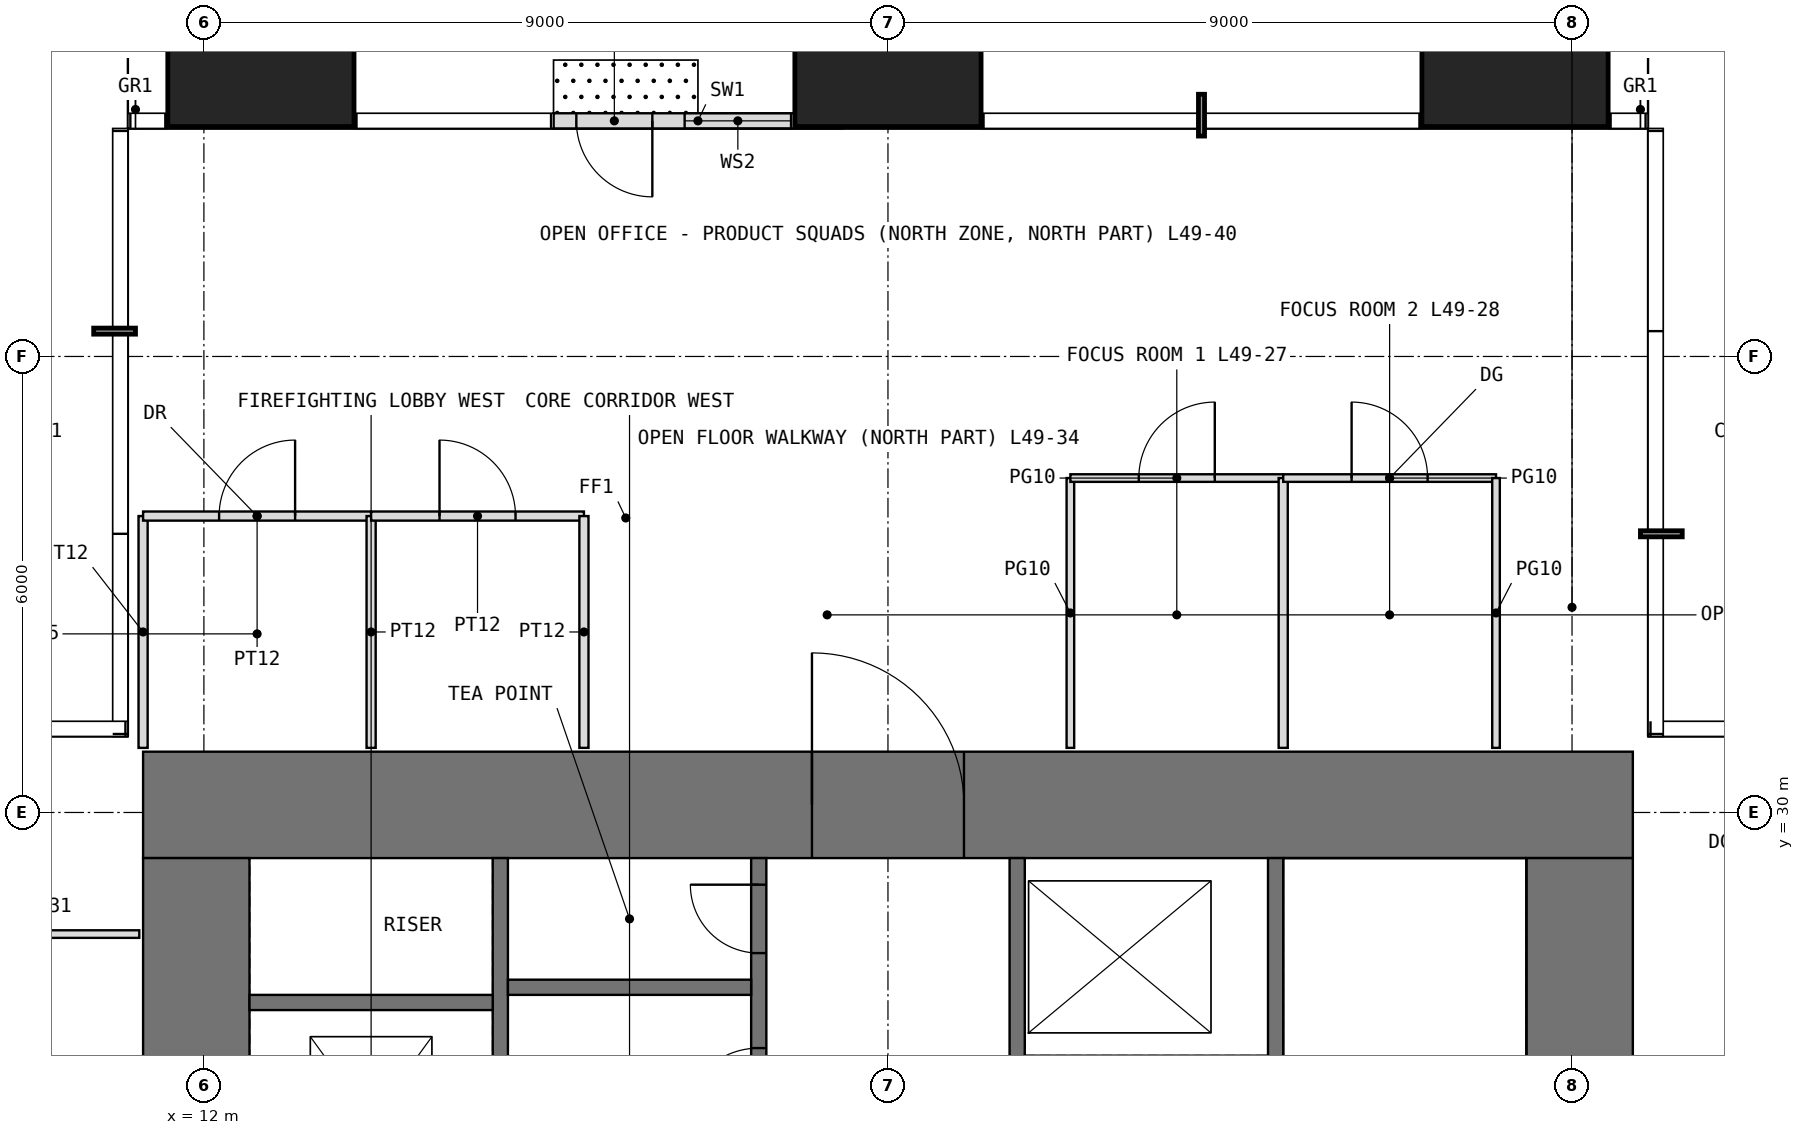
"""IFC4 building model, lengths in metres.
Left out: names, types, materials, properties, quantities, classifications, styles, units other than length and angle.
Written with IfcOpenShell. Run it as: python <this file> out.ifc"""

import sys

from ifc_helpers import new_model, si_unit, direction, frame, frame_2d, origin, origin_2d, place, context, subcontext, project, spatial, rectangle, extrude, element, fill, save


model = new_model("IFC4")
c1 = context("Model", 3, precision=1e-05, world=origin(), true_north=direction((0.0, 1.0)))
c2 = subcontext(c1, "Body", "Model", "MODEL_VIEW")
j1 = project(units=[si_unit("LENGTHUNIT", "METRE"), si_unit("PLANEANGLEUNIT", "RADIAN")], contexts=[c1])
p1 = place(None, origin())
s1 = spatial("IfcSite", under=j1, at=p1, CompositionType="ELEMENT")
p2 = place(p1, origin())
s2 = spatial("IfcBuilding", under=s1, at=p2, CompositionType="ELEMENT")
p3 = place(p2, frame((0.0, 0.0, 206.5)))
s3 = spatial("IfcBuildingStorey", under=s2, at=p3, CompositionType="ELEMENT", Elevation=206.5)
for number, where, z_axis, x_axis in (
    (1, (12.75, 40.25, 0.0), (0.0, 0.0, 1.0), (1.0, 0.0, 0.0)),
    (2, (21.0, 40.25, 0.0), (0.0, 0.0, 1.0), (1.0, 0.0, 0.0)),
    (3, (29.25, 40.25, 0.0), (0.0, 0.0, 1.0), (1.0, 0.0, 0.0)),
):
    element("IfcColumn", number, at=place(p3, frame(where, z_axis=z_axis, x_axis=x_axis)), inside=s3, PredefinedType="COLUMN", context=c2, shape_type="SweptSolid", body=[
        extrude(rectangle(XDim=2.45, YDim=2.45, at=origin_2d()), origin(), (0.0, 0.0, 1.0), 4.0),
    ])
p4 = place(p3, frame((20.4, 39.1, 0.0), z_axis=(0.0, 0.0, 1.0), x_axis=(-1.0, 0.0, 0.0)))
e4 = element("IfcWall", 4, at=p4, inside=s3, PredefinedType="USERDEFINED", context=c2, shape_type="SweptSolid", body=[
    extrude(rectangle(XDim=3.8, YDim=0.2, at=frame_2d((1.9, 0.0))), origin(), (0.0, 0.0, 1.0), 3.75),
])
p5 = place(p4, frame((2.5, 0.0, 0.0)))
e5 = element("IfcOpeningElement", 5, at=p5, cuts=e4, PredefinedType="OPENING", context=c2, shape_type="SweptSolid", body=[
    extrude(rectangle(XDim=1.0, YDim=2.4, at=frame_2d((0.5, 1.2))), frame((0.0, 0.11, 0.0), z_axis=(0.0, -1.0, 0.0), x_axis=(1.0, 0.0, 0.0)), (0.0, 0.0, 1.0), 0.22),
])
p6 = place(p4, frame((0.675, 0.0, 0.3)))
e6 = element("IfcOpeningElement", 6, at=p6, cuts=e4, PredefinedType="OPENING", context=c2, shape_type="SweptSolid", body=[
    extrude(rectangle(XDim=1.4, YDim=2.7, at=frame_2d((0.7, 1.35))), frame((0.0, 0.11, 0.0), z_axis=(0.0, -1.0, 0.0), x_axis=(1.0, 0.0, 0.0)), (0.0, 0.0, 1.0), 0.22),
])
p7 = place(p3, frame((11.2, 30.1, -0.05), z_axis=(0.0, 0.0, 1.0), x_axis=(1.0, 0.0, 0.0)))
e7 = element("IfcWall", 7, at=p7, inside=s3, PredefinedType="SHEAR", context=c2, shape_type="SweptSolid", body=[
    extrude(rectangle(XDim=19.6, YDim=1.4, at=frame_2d((9.8, 0.0))), origin(), (0.0, 0.0, 1.0), 4.0),
])
p8 = place(p7, frame((8.8, 0.0, 0.05)))
e8 = element("IfcOpeningElement", 8, at=p8, cuts=e7, PredefinedType="OPENING", context=c2, shape_type="SweptSolid", body=[
    extrude(rectangle(XDim=2.0, YDim=2.2, at=frame_2d((1.0, 1.1))), frame((0.0, 0.71, 0.0), z_axis=(0.0, -1.0, 0.0), x_axis=(1.0, 0.0, 0.0)), (0.0, 0.0, 1.0), 1.42),
])
p9 = place(p3, frame((11.9, 12.6, -0.05), z_axis=(0.0, 0.0, 1.0), x_axis=(0.0, 1.0, 0.0)))
e9 = element("IfcWall", 9, at=p9, inside=s3, PredefinedType="SHEAR", context=c2, shape_type="SweptSolid", body=[
    extrude(rectangle(XDim=16.8, YDim=1.4, at=frame_2d((8.4, 0.0))), origin(), (0.0, 0.0, 1.0), 4.0),
])
p10 = place(p9, frame((9.9, 0.0, 0.05)))
e10 = element("IfcOpeningElement", 10, at=p10, cuts=e9, PredefinedType="OPENING", context=c2, shape_type="SweptSolid", body=[
    extrude(rectangle(XDim=1.0, YDim=2.2, at=frame_2d((0.5, 1.1))), frame((0.0, 0.71, 0.0), z_axis=(0.0, -1.0, 0.0), x_axis=(1.0, 0.0, 0.0)), (0.0, 0.0, 1.0), 1.42),
])
p11 = place(p3, frame((30.1, 12.6, -0.05), z_axis=(0.0, 0.0, 1.0), x_axis=(0.0, 1.0, 0.0)))
e11 = element("IfcWall", 11, at=p11, inside=s3, PredefinedType="SHEAR", context=c2, shape_type="SweptSolid", body=[
    extrude(rectangle(XDim=16.8, YDim=1.4, at=frame_2d((8.4, 0.0))), origin(), (0.0, 0.0, 1.0), 4.0),
])
p12 = place(p11, frame((5.9, 0.0, 0.05)))
e12 = element("IfcOpeningElement", 12, at=p12, cuts=e11, PredefinedType="OPENING", context=c2, shape_type="SweptSolid", body=[
    extrude(rectangle(XDim=1.0, YDim=2.2, at=frame_2d((0.5, 1.1))), frame((0.0, 0.71, 0.0), z_axis=(0.0, -1.0, 0.0), x_axis=(1.0, 0.0, 0.0)), (0.0, 0.0, 1.0), 1.42),
])
p13 = place(p3, frame((15.9, 12.6, -0.05), z_axis=(0.0, 0.0, 1.0), x_axis=(0.0, 1.0, 0.0)))
e13 = element("IfcWall", 13, at=p13, inside=s3, PredefinedType="SHEAR", context=c2, shape_type="SweptSolid", body=[
    extrude(rectangle(XDim=16.8, YDim=0.2, at=frame_2d((8.4, 0.0))), origin(), (0.0, 0.0, 1.0), 4.0),
])
p14 = place(p13, frame((8.9, 0.0, 0.05)))
e14 = element("IfcOpeningElement", 14, at=p14, cuts=e13, PredefinedType="OPENING", context=c2, shape_type="SweptSolid", body=[
    extrude(rectangle(XDim=1.0, YDim=2.2, at=frame_2d((0.5, 1.1))), frame((0.0, 0.11, 0.0), z_axis=(0.0, -1.0, 0.0), x_axis=(1.0, 0.0, 0.0)), (0.0, 0.0, 1.0), 0.22),
])
p15 = place(p3, frame((19.3, 12.6, -0.05), z_axis=(0.0, 0.0, 1.0), x_axis=(0.0, 1.0, 0.0)))
e15 = element("IfcWall", 15, at=p15, inside=s3, PredefinedType="SHEAR", context=c2, shape_type="SweptSolid", body=[
    extrude(rectangle(XDim=16.8, YDim=0.2, at=frame_2d((8.4, 0.0))), origin(), (0.0, 0.0, 1.0), 4.0),
])
p16 = place(p15, frame((8.7, 0.0, 0.05)))
e16 = element("IfcOpeningElement", 16, at=p16, cuts=e15, PredefinedType="OPENING", context=c2, shape_type="SweptSolid", body=[
    extrude(rectangle(XDim=1.0, YDim=2.2, at=frame_2d((0.5, 1.1))), frame((0.0, 0.11, 0.0), z_axis=(0.0, -1.0, 0.0), x_axis=(1.0, 0.0, 0.0)), (0.0, 0.0, 1.0), 0.22),
])
p17 = place(p15, frame((10.85, 0.0, 0.05)))
e17 = element("IfcOpeningElement", 17, at=p17, cuts=e15, PredefinedType="OPENING", context=c2, shape_type="SweptSolid", body=[
    extrude(rectangle(XDim=0.9, YDim=2.2, at=frame_2d((0.45, 1.1))), frame((0.0, 0.11, 0.0), z_axis=(0.0, -1.0, 0.0), x_axis=(1.0, 0.0, 0.0)), (0.0, 0.0, 1.0), 0.22),
])
p18 = place(p15, frame((13.3, 0.0, 0.05)))
e18 = element("IfcOpeningElement", 18, at=p18, cuts=e15, PredefinedType="OPENING", context=c2, shape_type="SweptSolid", body=[
    extrude(rectangle(XDim=1.0, YDim=2.2, at=frame_2d((0.5, 1.1))), frame((0.0, 0.11, 0.0), z_axis=(0.0, -1.0, 0.0), x_axis=(1.0, 0.0, 0.0)), (0.0, 0.0, 1.0), 0.22),
])
p19 = place(p15, frame((15.55, 0.0, 0.05)))
e19 = element("IfcOpeningElement", 19, at=p19, cuts=e15, PredefinedType="OPENING", context=c2, shape_type="SweptSolid", body=[
    extrude(rectangle(XDim=0.9, YDim=2.2, at=frame_2d((0.45, 1.1))), frame((0.0, 0.11, 0.0), z_axis=(0.0, -1.0, 0.0), x_axis=(1.0, 0.0, 0.0)), (0.0, 0.0, 1.0), 0.22),
])
p20 = place(p15, frame((0.75, 0.0, 0.05)))
e20 = element("IfcOpeningElement", 20, at=p20, cuts=e15, PredefinedType="OPENING", context=c2, shape_type="SweptSolid", body=[
    extrude(rectangle(XDim=1.1, YDim=2.2, at=frame_2d((0.55, 1.1))), frame((0.0, 0.11, 0.0), z_axis=(0.0, -1.0, 0.0), x_axis=(1.0, 0.0, 0.0)), (0.0, 0.0, 1.0), 0.22),
])
p21 = place(p15, frame((3.55, 0.0, 0.05)))
e21 = element("IfcOpeningElement", 21, at=p21, cuts=e15, PredefinedType="OPENING", context=c2, shape_type="SweptSolid", body=[
    extrude(rectangle(XDim=1.1, YDim=2.2, at=frame_2d((0.55, 1.1))), frame((0.0, 0.11, 0.0), z_axis=(0.0, -1.0, 0.0), x_axis=(1.0, 0.0, 0.0)), (0.0, 0.0, 1.0), 0.22),
])
p22 = place(p15, frame((6.35, 0.0, 0.05)))
e22 = element("IfcOpeningElement", 22, at=p22, cuts=e15, PredefinedType="OPENING", context=c2, shape_type="SweptSolid", body=[
    extrude(rectangle(XDim=1.1, YDim=2.2, at=frame_2d((0.55, 1.1))), frame((0.0, 0.11, 0.0), z_axis=(0.0, -1.0, 0.0), x_axis=(1.0, 0.0, 0.0)), (0.0, 0.0, 1.0), 0.22),
])
p23 = place(p3, frame((22.7, 12.6, -0.05), z_axis=(0.0, 0.0, 1.0), x_axis=(0.0, 1.0, 0.0)))
e23 = element("IfcWall", 23, at=p23, inside=s3, PredefinedType="SHEAR", context=c2, shape_type="SweptSolid", body=[
    extrude(rectangle(XDim=16.8, YDim=0.2, at=frame_2d((8.4, 0.0))), origin(), (0.0, 0.0, 1.0), 4.0),
])
p24 = place(p23, frame((3.05, 0.0, 0.05)))
e24 = element("IfcOpeningElement", 24, at=p24, cuts=e23, PredefinedType="OPENING", context=c2, shape_type="SweptSolid", body=[
    extrude(rectangle(XDim=0.9, YDim=2.2, at=frame_2d((0.45, 1.1))), frame((0.0, 0.11, 0.0), z_axis=(0.0, -1.0, 0.0), x_axis=(1.0, 0.0, 0.0)), (0.0, 0.0, 1.0), 0.22),
])
p25 = place(p23, frame((7.1, 0.0, 0.05)))
e25 = element("IfcOpeningElement", 25, at=p25, cuts=e23, PredefinedType="OPENING", context=c2, shape_type="SweptSolid", body=[
    extrude(rectangle(XDim=1.0, YDim=2.2, at=frame_2d((0.5, 1.1))), frame((0.0, 0.11, 0.0), z_axis=(0.0, -1.0, 0.0), x_axis=(1.0, 0.0, 0.0)), (0.0, 0.0, 1.0), 0.22),
])
p26 = place(p23, frame((1.55, 0.0, 0.05)))
e26 = element("IfcOpeningElement", 26, at=p26, cuts=e23, PredefinedType="OPENING", context=c2, shape_type="SweptSolid", body=[
    extrude(rectangle(XDim=0.9, YDim=2.2, at=frame_2d((0.45, 1.1))), frame((0.0, 0.11, 0.0), z_axis=(0.0, -1.0, 0.0), x_axis=(1.0, 0.0, 0.0)), (0.0, 0.0, 1.0), 0.22),
])
p27 = place(p23, frame((4.95, 0.0, 0.05)))
e27 = element("IfcOpeningElement", 27, at=p27, cuts=e23, PredefinedType="OPENING", context=c2, shape_type="SweptSolid", body=[
    extrude(rectangle(XDim=0.9, YDim=2.2, at=frame_2d((0.45, 1.1))), frame((0.0, 0.11, 0.0), z_axis=(0.0, -1.0, 0.0), x_axis=(1.0, 0.0, 0.0)), (0.0, 0.0, 1.0), 0.22),
])
p28 = place(p23, frame((9.4, 0.0, 0.05)))
e28 = element("IfcOpeningElement", 28, at=p28, cuts=e23, PredefinedType="OPENING", context=c2, shape_type="SweptSolid", body=[
    extrude(rectangle(XDim=1.0, YDim=2.2, at=frame_2d((0.5, 1.1))), frame((0.0, 0.11, 0.0), z_axis=(0.0, -1.0, 0.0), x_axis=(1.0, 0.0, 0.0)), (0.0, 0.0, 1.0), 0.22),
])
p29 = place(p23, frame((12.2, 0.0, 0.05)))
e29 = element("IfcOpeningElement", 29, at=p29, cuts=e23, PredefinedType="OPENING", context=c2, shape_type="SweptSolid", body=[
    extrude(rectangle(XDim=1.0, YDim=2.2, at=frame_2d((0.5, 1.1))), frame((0.0, 0.11, 0.0), z_axis=(0.0, -1.0, 0.0), x_axis=(1.0, 0.0, 0.0)), (0.0, 0.0, 1.0), 0.22),
])
p30 = place(p3, frame((26.1, 12.6, -0.05), z_axis=(0.0, 0.0, 1.0), x_axis=(0.0, 1.0, 0.0)))
e30 = element("IfcWall", 30, at=p30, inside=s3, PredefinedType="SHEAR", context=c2, shape_type="SweptSolid", body=[
    extrude(rectangle(XDim=16.8, YDim=0.2, at=frame_2d((8.4, 0.0))), origin(), (0.0, 0.0, 1.0), 4.0),
])
p31 = place(p30, frame((6.9, 0.0, 0.05)))
e31 = element("IfcOpeningElement", 31, at=p31, cuts=e30, PredefinedType="OPENING", context=c2, shape_type="SweptSolid", body=[
    extrude(rectangle(XDim=1.0, YDim=2.2, at=frame_2d((0.5, 1.1))), frame((0.0, 0.11, 0.0), z_axis=(0.0, -1.0, 0.0), x_axis=(1.0, 0.0, 0.0)), (0.0, 0.0, 1.0), 0.22),
])
for number, where, z_axis, x_axis in (
    (32, (12.6, 27.5, -0.05), (0.0, 0.0, 1.0), (1.0, 0.0, 0.0)),
    (33, (16.0, 27.7, -0.05), (0.0, 0.0, 1.0), (1.0, 0.0, 0.0)),
):
    element("IfcWall", number, at=place(p3, frame(where, z_axis=z_axis, x_axis=x_axis)), inside=s3, PredefinedType="SHEAR", context=c2, shape_type="SweptSolid", body=[
        extrude(rectangle(XDim=3.2, YDim=0.2, at=frame_2d((1.6, 0.0))), origin(), (0.0, 0.0, 1.0), 4.0),
    ])
p32 = place(p3, frame((8.4, 28.4, 0.0), z_axis=(0.0, 0.0, 1.0), x_axis=(1.0, 0.0, 0.0)))
e34 = element("IfcWall", 34, at=p32, inside=s3, PredefinedType="PARTITIONING", context=c2, shape_type="SweptSolid", body=[
    extrude(rectangle(XDim=2.75, YDim=0.1, at=frame_2d((1.375, 0.0))), origin(), (0.0, 0.0, 1.0), 3.75),
])
p33 = place(p3, frame((11.2, 30.85, 0.0), z_axis=(0.0, 0.0, 1.0), x_axis=(0.0, 1.0, 0.0)))
e35 = element("IfcWall", 35, at=p33, inside=s3, PredefinedType="PARTITIONING", context=c2, shape_type="SweptSolid", body=[
    extrude(rectangle(XDim=3.05, YDim=0.12, at=frame_2d((1.525, 0.0))), origin(), (0.0, 0.0, 1.0), 3.75),
])
p34 = place(p3, frame((11.2, 33.9, 0.0), z_axis=(0.0, 0.0, 1.0), x_axis=(1.0, 0.0, 0.0)))
e36 = element("IfcWall", 36, at=p34, inside=s3, PredefinedType="PARTITIONING", context=c2, shape_type="SweptSolid", body=[
    extrude(rectangle(XDim=3.0, YDim=0.12, at=frame_2d((1.5, 0.0))), origin(), (0.0, 0.0, 1.0), 3.75),
])
p35 = place(p34, frame((1.0, 0.0, 0.0)))
e37 = element("IfcOpeningElement", 37, at=p35, cuts=e36, PredefinedType="OPENING", context=c2, shape_type="SweptSolid", body=[
    extrude(rectangle(XDim=1.0, YDim=2.2, at=frame_2d((0.5, 1.1))), frame((0.0, 0.07, 0.0), z_axis=(0.0, -1.0, 0.0), x_axis=(1.0, 0.0, 0.0)), (0.0, 0.0, 1.0), 0.14),
])
p36 = place(p3, frame((14.2, 30.85, 0.0), z_axis=(0.0, 0.0, 1.0), x_axis=(0.0, 1.0, 0.0)))
e38 = element("IfcWall", 38, at=p36, inside=s3, PredefinedType="PARTITIONING", context=c2, shape_type="SweptSolid", body=[
    extrude(rectangle(XDim=3.05, YDim=0.12, at=frame_2d((1.525, 0.0))), origin(), (0.0, 0.0, 1.0), 3.75),
])
p37 = place(p3, frame((14.2, 33.9, 0.0), z_axis=(0.0, 0.0, 1.0), x_axis=(1.0, 0.0, 0.0)))
e39 = element("IfcWall", 39, at=p37, inside=s3, PredefinedType="PARTITIONING", context=c2, shape_type="SweptSolid", body=[
    extrude(rectangle(XDim=2.8, YDim=0.12, at=frame_2d((1.4, 0.0))), origin(), (0.0, 0.0, 1.0), 3.75),
])
p38 = place(p37, frame((0.9, 0.0, 0.0)))
e40 = element("IfcOpeningElement", 40, at=p38, cuts=e39, PredefinedType="OPENING", context=c2, shape_type="SweptSolid", body=[
    extrude(rectangle(XDim=1.0, YDim=2.2, at=frame_2d((0.5, 1.1))), frame((0.0, 0.07, 0.0), z_axis=(0.0, -1.0, 0.0), x_axis=(1.0, 0.0, 0.0)), (0.0, 0.0, 1.0), 0.14),
])
p39 = place(p3, frame((17.0, 30.85, 0.0), z_axis=(0.0, 0.0, 1.0), x_axis=(0.0, 1.0, 0.0)))
e41 = element("IfcWall", 41, at=p39, inside=s3, PredefinedType="PARTITIONING", context=c2, shape_type="SweptSolid", body=[
    extrude(rectangle(XDim=3.05, YDim=0.12, at=frame_2d((1.525, 0.0))), origin(), (0.0, 0.0, 1.0), 3.75),
])
p40 = place(p3, frame((23.4, 30.85, 0.0), z_axis=(0.0, 0.0, 1.0), x_axis=(0.0, 1.0, 0.0)))
e42 = element("IfcWall", 42, at=p40, inside=s3, PredefinedType="PARTITIONING", context=c2, shape_type="SweptSolid", body=[
    extrude(rectangle(XDim=3.55, YDim=0.1, at=frame_2d((1.775, 0.0))), origin(), (0.0, 0.0, 1.0), 3.75),
])
p41 = place(p3, frame((23.4, 34.4, 0.0), z_axis=(0.0, 0.0, 1.0), x_axis=(1.0, 0.0, 0.0)))
e43 = element("IfcWall", 43, at=p41, inside=s3, PredefinedType="PARTITIONING", context=c2, shape_type="SweptSolid", body=[
    extrude(rectangle(XDim=2.8, YDim=0.1, at=frame_2d((1.4, 0.0))), origin(), (0.0, 0.0, 1.0), 3.75),
])
p42 = place(p41, frame((0.9, 0.0, 0.0)))
e44 = element("IfcOpeningElement", 44, at=p42, cuts=e43, PredefinedType="OPENING", context=c2, shape_type="SweptSolid", body=[
    extrude(rectangle(XDim=1.0, YDim=2.4, at=frame_2d((0.5, 1.2))), frame((0.0, 0.06, 0.0), z_axis=(0.0, -1.0, 0.0), x_axis=(1.0, 0.0, 0.0)), (0.0, 0.0, 1.0), 0.12),
])
p43 = place(p3, frame((26.2, 30.85, 0.0), z_axis=(0.0, 0.0, 1.0), x_axis=(0.0, 1.0, 0.0)))
e45 = element("IfcWall", 45, at=p43, inside=s3, PredefinedType="PARTITIONING", context=c2, shape_type="SweptSolid", body=[
    extrude(rectangle(XDim=3.55, YDim=0.12, at=frame_2d((1.775, 0.0))), origin(), (0.0, 0.0, 1.0), 3.75),
])
p44 = place(p3, frame((26.2, 34.4, 0.0), z_axis=(0.0, 0.0, 1.0), x_axis=(1.0, 0.0, 0.0)))
e46 = element("IfcWall", 46, at=p44, inside=s3, PredefinedType="PARTITIONING", context=c2, shape_type="SweptSolid", body=[
    extrude(rectangle(XDim=2.8, YDim=0.1, at=frame_2d((1.4, 0.0))), origin(), (0.0, 0.0, 1.0), 3.75),
])
p45 = place(p44, frame((0.9, 0.0, 0.0)))
e47 = element("IfcOpeningElement", 47, at=p45, cuts=e46, PredefinedType="OPENING", context=c2, shape_type="SweptSolid", body=[
    extrude(rectangle(XDim=1.0, YDim=2.4, at=frame_2d((0.5, 1.2))), frame((0.0, 0.06, 0.0), z_axis=(0.0, -1.0, 0.0), x_axis=(1.0, 0.0, 0.0)), (0.0, 0.0, 1.0), 0.12),
])
p46 = place(p3, frame((29.0, 30.85, 0.0), z_axis=(0.0, 0.0, 1.0), x_axis=(0.0, 1.0, 0.0)))
e48 = element("IfcWall", 48, at=p46, inside=s3, PredefinedType="PARTITIONING", context=c2, shape_type="SweptSolid", body=[
    extrude(rectangle(XDim=3.55, YDim=0.1, at=frame_2d((1.775, 0.0))), origin(), (0.0, 0.0, 1.0), 3.75),
])
p47 = place(p5, origin())
e49 = element("IfcDoor", 49, at=p47, inside=s3, OperationType="SINGLE_SWING_LEFT", PredefinedType="DOOR", context=c2, shape_type="SweptSolid", body=[
    extrude(rectangle(XDim=1.0, YDim=2.4, at=frame_2d((0.5, 1.2))), frame((0.0, 0.025, 0.0), z_axis=(0.0, -1.0, 0.0), x_axis=(1.0, 0.0, 0.0)), (0.0, 0.0, 1.0), 0.05),
])
fill(e5, e49)
p48 = place(p6, origin())
e50 = element("IfcWindow", 50, at=p48, inside=s3, PartitioningType="SINGLE_PANEL", PredefinedType="WINDOW", context=c2, shape_type="SweptSolid", body=[
    extrude(rectangle(XDim=1.4, YDim=2.7, at=frame_2d((0.7, 1.35))), frame((0.0, 0.03, 0.0), z_axis=(0.0, -1.0, 0.0), x_axis=(1.0, 0.0, 0.0)), (0.0, 0.0, 1.0), 0.06),
])
fill(e6, e50)
p49 = place(p8, origin())
e51 = element("IfcDoor", 51, at=p49, inside=s3, OperationType="DOUBLE_DOOR_SINGLE_SWING", PredefinedType="DOOR", context=c2, shape_type="SweptSolid", body=[
    extrude(rectangle(XDim=2.0, YDim=2.2, at=frame_2d((1.0, 1.1))), frame((0.0, 0.025, 0.0), z_axis=(0.0, -1.0, 0.0), x_axis=(1.0, 0.0, 0.0)), (0.0, 0.0, 1.0), 0.05),
])
fill(e8, e51)
p50 = place(p18, origin())
e52 = element("IfcDoor", 52, at=p50, inside=s3, OperationType="SINGLE_SWING_LEFT", PredefinedType="DOOR", context=c2, shape_type="SweptSolid", body=[
    extrude(rectangle(XDim=1.0, YDim=2.2, at=frame_2d((0.5, 1.1))), frame((0.0, 0.025, 0.0), z_axis=(0.0, -1.0, 0.0), x_axis=(1.0, 0.0, 0.0)), (0.0, 0.0, 1.0), 0.05),
])
fill(e18, e52)
p51 = place(p19, origin())
e53 = element("IfcDoor", 53, at=p51, inside=s3, OperationType="SINGLE_SWING_RIGHT", PredefinedType="DOOR", context=c2, shape_type="SweptSolid", body=[
    extrude(rectangle(XDim=0.9, YDim=2.2, at=frame_2d((0.45, 1.1))), frame((0.0, 0.025, 0.0), z_axis=(0.0, -1.0, 0.0), x_axis=(1.0, 0.0, 0.0)), (0.0, 0.0, 1.0), 0.05),
])
fill(e19, e53)
p52 = place(p35, origin())
e54 = element("IfcDoor", 54, at=p52, inside=s3, OperationType="SINGLE_SWING_RIGHT", PredefinedType="DOOR", context=c2, shape_type="SweptSolid", body=[
    extrude(rectangle(XDim=1.0, YDim=2.2, at=frame_2d((0.5, 1.1))), frame((0.0, 0.025, 0.0), z_axis=(0.0, -1.0, 0.0), x_axis=(1.0, 0.0, 0.0)), (0.0, 0.0, 1.0), 0.05),
])
fill(e37, e54)
p53 = place(p38, origin())
e55 = element("IfcDoor", 55, at=p53, inside=s3, OperationType="SINGLE_SWING_LEFT", PredefinedType="DOOR", context=c2, shape_type="SweptSolid", body=[
    extrude(rectangle(XDim=1.0, YDim=2.2, at=frame_2d((0.5, 1.1))), frame((0.0, 0.025, 0.0), z_axis=(0.0, -1.0, 0.0), x_axis=(1.0, 0.0, 0.0)), (0.0, 0.0, 1.0), 0.05),
])
fill(e40, e55)
p54 = place(p42, origin())
e56 = element("IfcDoor", 56, at=p54, inside=s3, OperationType="SINGLE_SWING_RIGHT", PredefinedType="DOOR", context=c2, shape_type="SweptSolid", body=[
    extrude(rectangle(XDim=1.0, YDim=2.4, at=frame_2d((0.5, 1.2))), frame((0.0, 0.025, 0.0), z_axis=(0.0, -1.0, 0.0), x_axis=(1.0, 0.0, 0.0)), (0.0, 0.0, 1.0), 0.05),
])
fill(e44, e56)
p55 = place(p45, origin())
e57 = element("IfcDoor", 57, at=p55, inside=s3, OperationType="SINGLE_SWING_LEFT", PredefinedType="DOOR", context=c2, shape_type="SweptSolid", body=[
    extrude(rectangle(XDim=1.0, YDim=2.4, at=frame_2d((0.5, 1.2))), frame((0.0, 0.025, 0.0), z_axis=(0.0, -1.0, 0.0), x_axis=(1.0, 0.0, 0.0)), (0.0, 0.0, 1.0), 0.05),
])
fill(e47, e57)
save(model, sys.argv[1])
